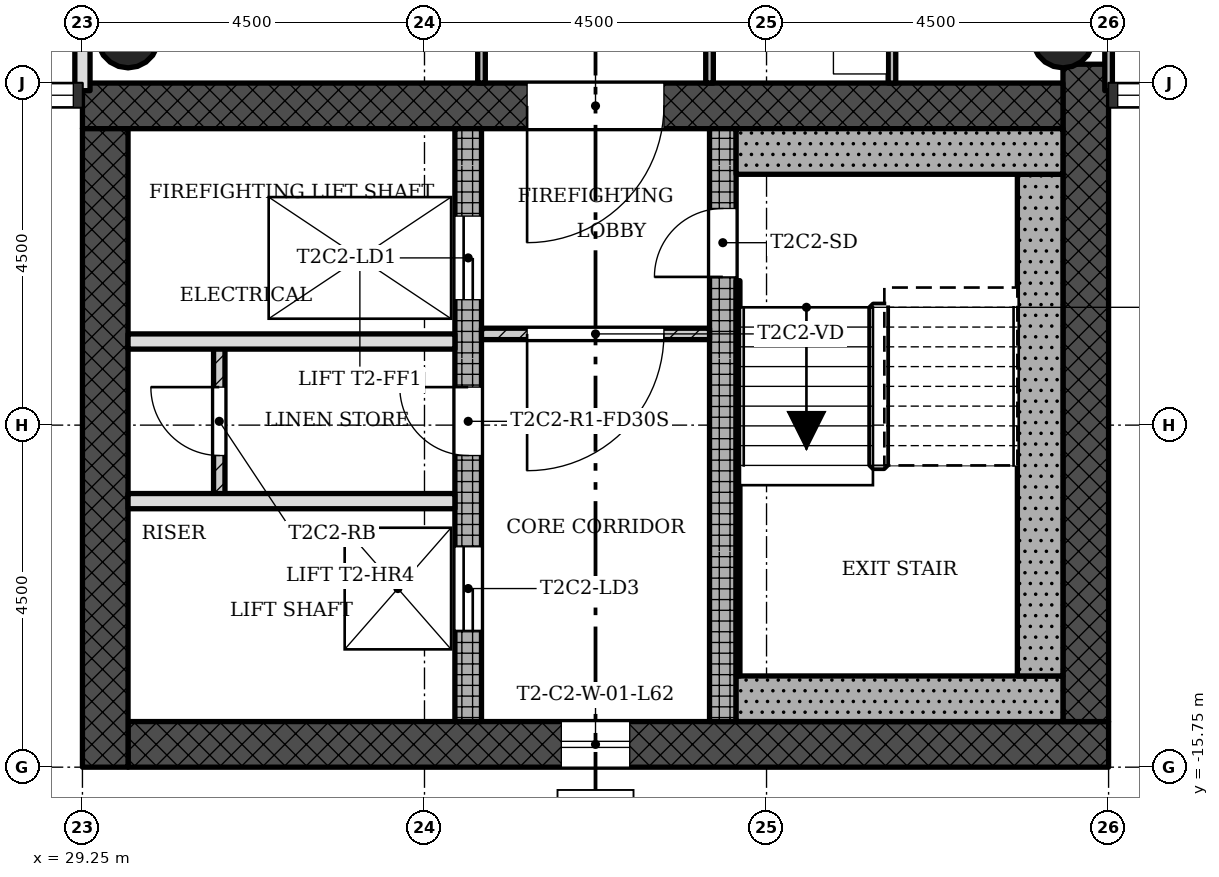
"""IFC4 building model, lengths in metres.
Left out: names, types, materials, properties, quantities, classifications, styles, units other than length and angle.
Written with IfcOpenShell. Run it as: python <this file> out.ifc"""

import sys

from ifc_helpers import new_model, si_unit, direction, frame, frame_2d, origin, origin_2d, place, context, subcontext, project, spatial, rectangle, hollow_circle, extrude, element, fill, save


model = new_model("IFC4")
c1 = context("Model", 3, precision=1e-05, world=origin(), true_north=direction((0.0, 1.0)))
c2 = subcontext(c1, "Body", "Model", "MODEL_VIEW")
j1 = project(units=[si_unit("LENGTHUNIT", "METRE"), si_unit("PLANEANGLEUNIT", "RADIAN")], contexts=[c1])
p1 = place(None, origin())
s1 = spatial("IfcSite", under=j1, at=p1, CompositionType="ELEMENT")
p2 = place(p1, origin())
s2 = spatial("IfcBuilding", under=s1, at=p2, CompositionType="ELEMENT")
p3 = place(p2, frame((0.0, 0.0, 223.2)))
s3 = spatial("IfcBuildingStorey", under=s2, at=p3, CompositionType="ELEMENT", Elevation=223.2)
p4 = place(p3, frame((29.85, -15.45, 0.0), z_axis=(0.0, 0.0, 1.0), x_axis=(1.0, 0.0, 0.0)))
e1 = element("IfcWall", 1, at=p4, inside=s3, PredefinedType="SHEAR", context=c2, shape_type="SweptSolid", body=[
    extrude(rectangle(XDim=12.9, YDim=0.6, at=frame_2d((6.45, 0.0))), origin(), (0.0, 0.0, 1.0), 3.4),
])
p5 = place(p4, frame((5.7, 0.0, 0.45)))
e2 = element("IfcOpeningElement", 2, at=p5, cuts=e1, PredefinedType="OPENING", context=c2, shape_type="SweptSolid", body=[
    extrude(rectangle(XDim=0.9, YDim=2.4, at=frame_2d((0.45, 1.2))), frame((0.0, 0.31, 0.0), z_axis=(0.0, -1.0, 0.0), x_axis=(1.0, 0.0, 0.0)), (0.0, 0.0, 1.0), 0.62),
])
p6 = place(p3, frame((42.45, -15.15, 0.0), z_axis=(0.0, 0.0, 1.0), x_axis=(0.0, 1.0, 0.0)))
e3 = element("IfcWall", 3, at=p6, inside=s3, PredefinedType="SHEAR", context=c2, shape_type="SweptSolid", body=[
    extrude(rectangle(XDim=8.648, YDim=0.6, at=frame_2d((4.324, 0.0))), origin(), (0.0, 0.0, 1.0), 3.4),
])
p7 = place(p3, frame((42.15, -7.05, 0.0), z_axis=(0.0, 0.0, 1.0), x_axis=(-1.0, 0.0, 0.0)))
e4 = element("IfcWall", 4, at=p7, inside=s3, PredefinedType="SHEAR", context=c2, shape_type="SweptSolid", body=[
    extrude(rectangle(XDim=12.9, YDim=0.6, at=frame_2d((6.45, 0.0))), origin(), (0.0, 0.0, 1.0), 3.4),
])
p8 = place(p7, frame((5.25, 0.0, 0.0)))
e5 = element("IfcOpeningElement", 5, at=p8, cuts=e4, PredefinedType="OPENING", context=c2, shape_type="SweptSolid", body=[
    extrude(rectangle(XDim=1.8, YDim=2.1, at=frame_2d((0.9, 1.05))), frame((0.0, 0.31, 0.0), z_axis=(0.0, -1.0, 0.0), x_axis=(1.0, 0.0, 0.0)), (0.0, 0.0, 1.0), 0.62),
])
p9 = place(p3, frame((29.55, -7.35, 0.0), z_axis=(0.0, 0.0, 1.0), x_axis=(0.0, -1.0, 0.0)))
e6 = element("IfcWall", 6, at=p9, inside=s3, PredefinedType="SHEAR", context=c2, shape_type="SweptSolid", body=[
    extrude(rectangle(XDim=8.4, YDim=0.6, at=frame_2d((4.2, 0.0))), origin(), (0.0, 0.0, 1.0), 3.4),
])
p10 = place(p3, frame((34.325, -15.15, 0.0), z_axis=(0.0, 0.0, 1.0), x_axis=(0.0, 1.0, 0.0)))
e7 = element("IfcWall", 7, at=p10, inside=s3, PredefinedType="SHEAR", context=c2, shape_type="SweptSolid", body=[
    extrude(rectangle(XDim=7.8, YDim=0.35, at=frame_2d((3.9, 0.0))), origin(), (0.0, 0.0, 1.0), 3.4),
])
p11 = place(p10, frame((5.55, 0.0, 0.0)))
e8 = element("IfcOpeningElement", 8, at=p11, cuts=e7, PredefinedType="OPENING", context=c2, shape_type="SweptSolid", body=[
    extrude(rectangle(XDim=1.1, YDim=2.1, at=frame_2d((0.55, 1.05))), frame((0.0, 0.185, 0.0), z_axis=(0.0, -1.0, 0.0), x_axis=(1.0, 0.0, 0.0)), (0.0, 0.0, 1.0), 0.37),
])
p12 = place(p10, frame((1.2, 0.0, 0.0)))
e9 = element("IfcOpeningElement", 9, at=p12, cuts=e7, PredefinedType="OPENING", context=c2, shape_type="SweptSolid", body=[
    extrude(rectangle(XDim=1.1, YDim=2.1, at=frame_2d((0.55, 1.05))), frame((0.0, 0.185, 0.0), z_axis=(0.0, -1.0, 0.0), x_axis=(1.0, 0.0, 0.0)), (0.0, 0.0, 1.0), 0.37),
])
p13 = place(p10, frame((3.5, 0.0, 0.0)))
e10 = element("IfcOpeningElement", 10, at=p13, cuts=e7, PredefinedType="OPENING", context=c2, shape_type="SweptSolid", body=[
    extrude(rectangle(XDim=0.9, YDim=2.1, at=frame_2d((0.45, 1.05))), frame((0.0, 0.185, 0.0), z_axis=(0.0, -1.0, 0.0), x_axis=(1.0, 0.0, 0.0)), (0.0, 0.0, 1.0), 0.37),
])
p14 = place(p3, frame((37.675, -15.15, 0.0), z_axis=(0.0, 0.0, 1.0), x_axis=(0.0, 1.0, 0.0)))
e11 = element("IfcWall", 11, at=p14, inside=s3, PredefinedType="SHEAR", context=c2, shape_type="SweptSolid", body=[
    extrude(rectangle(XDim=7.8, YDim=0.35, at=frame_2d((3.9, 0.0))), origin(), (0.0, 0.0, 1.0), 3.4),
])
p15 = place(p14, frame((5.85, 0.0, 0.0)))
e12 = element("IfcOpeningElement", 12, at=p15, cuts=e11, PredefinedType="OPENING", context=c2, shape_type="SweptSolid", body=[
    extrude(rectangle(XDim=0.9, YDim=2.1, at=frame_2d((0.45, 1.05))), frame((0.0, 0.185, 0.0), z_axis=(0.0, -1.0, 0.0), x_axis=(1.0, 0.0, 0.0)), (0.0, 0.0, 1.0), 0.37),
])
for number, where, z_axis, x_axis in (
    (13, (42.15, -6.15, 0.0), (0.0, 0.0, 1.0), (1.0, 0.0, 0.0)),
    (14, (29.85, -6.15, 0.0), (0.0, 0.0, 1.0), (1.0, 0.0, 0.0)),
):
    element("IfcColumn", number, at=place(p3, frame(where, z_axis=z_axis, x_axis=x_axis)), inside=s3, PredefinedType="COLUMN", context=c2, shape_type="SweptSolid", body=[
        extrude(hollow_circle(Radius=0.4, WallThickness=0.028, at=origin_2d()), origin(), (0.0, 0.0, 1.0), 3.4),
    ])
p16 = place(p3, frame((34.5, -10.05, 0.0), z_axis=(0.0, 0.0, 1.0), x_axis=(1.0, 0.0, 0.0)))
e15 = element("IfcWall", 15, at=p16, inside=s3, PredefinedType="PARTITIONING", context=c2, shape_type="SweptSolid", body=[
    extrude(rectangle(XDim=3.0, YDim=0.15, at=frame_2d((1.5, 0.0))), origin(), (0.0, 0.0, 1.0), 3.0),
])
p17 = place(p16, frame((0.6, 0.0, 0.0)))
e16 = element("IfcOpeningElement", 16, at=p17, cuts=e15, PredefinedType="OPENING", context=c2, shape_type="SweptSolid", body=[
    extrude(rectangle(XDim=1.8, YDim=2.1, at=frame_2d((0.9, 1.05))), frame((0.0, 0.085, 0.0), z_axis=(0.0, -1.0, 0.0), x_axis=(1.0, 0.0, 0.0)), (0.0, 0.0, 1.0), 0.17),
])
for number, where, z_axis, x_axis in (
    (17, (29.85, -12.25, 0.0), (0.0, 0.0, 1.0), (1.0, 0.0, 0.0)),
    (18, (29.85, -10.15, 0.0), (0.0, 0.0, 1.0), (1.0, 0.0, 0.0)),
):
    element("IfcWall", number, at=place(p3, frame(where, z_axis=z_axis, x_axis=x_axis)), inside=s3, PredefinedType="SOLIDWALL", context=c2, shape_type="SweptSolid", body=[
        extrude(rectangle(XDim=4.3, YDim=0.2, at=frame_2d((2.15, 0.0))), origin(), (0.0, 0.0, 1.0), 3.0),
    ])
p18 = place(p3, frame((31.05, -10.15, 0.0), z_axis=(0.0, 0.0, 1.0), x_axis=(0.0, -1.0, 0.0)))
e19 = element("IfcWall", 19, at=p18, inside=s3, PredefinedType="PARTITIONING", context=c2, shape_type="SweptSolid", body=[
    extrude(rectangle(XDim=2.1, YDim=0.15, at=frame_2d((1.05, 0.0))), origin(), (0.0, 0.0, 1.0), 3.0),
])
p19 = place(p18, frame((0.6, 0.0, 0.0)))
e20 = element("IfcOpeningElement", 20, at=p19, cuts=e19, PredefinedType="OPENING", context=c2, shape_type="SweptSolid", body=[
    extrude(rectangle(XDim=0.9, YDim=2.1, at=frame_2d((0.45, 1.05))), frame((0.0, 0.085, 0.0), z_axis=(0.0, -1.0, 0.0), x_axis=(1.0, 0.0, 0.0)), (0.0, 0.0, 1.0), 0.17),
])
p20 = place(p3, frame((42.75, -6.85, 0.0), z_axis=(0.0, 0.0, 1.0), x_axis=(0.0, 1.0, 0.0)))
e21 = element("IfcWall", 21, at=p20, inside=s3, PredefinedType="PARTITIONING", context=c2, shape_type="SweptSolid", body=[
    extrude(rectangle(XDim=5.95, YDim=0.1, at=frame_2d((2.975, 0.0))), origin(), (0.0, 0.0, 1.0), 3.0),
])
p21 = place(p3, frame((39.9, -6.75, 0.0), z_axis=(0.0, 0.0, 1.0), x_axis=(0.0, 1.0, 0.0)))
e22 = element("IfcWall", 22, at=p21, inside=s3, PredefinedType="PARTITIONING", context=c2, shape_type="SweptSolid", body=[
    extrude(rectangle(XDim=2.25, YDim=0.1, at=frame_2d((1.125, 0.0))), origin(), (0.0, 0.0, 1.0), 3.0),
])
p22 = place(p3, frame((37.5, -6.75, 0.0), z_axis=(0.0, 0.0, 1.0), x_axis=(0.0, 1.0, 0.0)))
e23 = element("IfcWall", 23, at=p22, inside=s3, PredefinedType="PARTITIONING", context=c2, shape_type="SweptSolid", body=[
    extrude(rectangle(XDim=2.25, YDim=0.1, at=frame_2d((1.125, 0.0))), origin(), (0.0, 0.0, 1.0), 3.0),
])
p23 = place(p22, frame((0.675, 0.0, 0.0)))
e24 = element("IfcOpeningElement", 24, at=p23, cuts=e23, PredefinedType="OPENING", context=c2, shape_type="SweptSolid", body=[
    extrude(rectangle(XDim=0.9, YDim=2.1, at=frame_2d((0.45, 1.05))), frame((0.0, 0.06, 0.0), z_axis=(0.0, -1.0, 0.0), x_axis=(1.0, 0.0, 0.0)), (0.0, 0.0, 1.0), 0.12),
])
p24 = place(p3, frame((34.5, -6.75, 0.0), z_axis=(0.0, 0.0, 1.0), x_axis=(0.0, 1.0, 0.0)))
e25 = element("IfcWall", 25, at=p24, inside=s3, PredefinedType="PARTITIONING", context=c2, shape_type="SweptSolid", body=[
    extrude(rectangle(XDim=2.25, YDim=0.1, at=frame_2d((1.125, 0.0))), origin(), (0.0, 0.0, 1.0), 3.0),
])
p25 = place(p3, frame((29.25, -6.85, 0.0), z_axis=(0.0, 0.0, 1.0), x_axis=(0.0, 1.0, 0.0)))
e26 = element("IfcWall", 26, at=p25, inside=s3, PredefinedType="SOLIDWALL", context=c2, shape_type="SweptSolid", body=[
    extrude(rectangle(XDim=13.7, YDim=0.2, at=frame_2d((6.85, 0.0))), origin(), (0.0, 0.0, 1.0), 3.0),
])
p26 = place(p25, frame((6.4, 0.0, 0.0)))
e27 = element("IfcOpeningElement", 27, at=p26, cuts=e26, PredefinedType="OPENING", context=c2, shape_type="SweptSolid", body=[
    extrude(rectangle(XDim=0.9, YDim=2.1, at=frame_2d((0.45, 1.05))), frame((0.0, 0.11, 0.0), z_axis=(0.0, -1.0, 0.0), x_axis=(1.0, 0.0, 0.0)), (0.0, 0.0, 1.0), 0.22),
])
p27 = place(p3, frame((37.85, -14.85, 0.0), z_axis=(0.0, 0.0, 1.0), x_axis=(1.0, 0.0, 0.0)))
e28 = element("IfcWall", 28, at=p27, inside=s3, PredefinedType="SHEAR", context=c2, shape_type="SweptSolid", body=[
    extrude(rectangle(XDim=4.3, YDim=0.6, at=frame_2d((2.15, 0.0))), origin(), (0.0, 0.0, 1.0), 3.4),
])
p28 = place(p3, frame((41.85, -7.95, 0.0), z_axis=(0.0, 0.0, 1.0), x_axis=(0.0, -1.0, 0.0)))
e29 = element("IfcWall", 29, at=p28, inside=s3, PredefinedType="SHEAR", context=c2, shape_type="SweptSolid", body=[
    extrude(rectangle(XDim=6.6, YDim=0.6, at=frame_2d((3.3, 0.0))), origin(), (0.0, 0.0, 1.0), 3.4),
])
p29 = place(p3, frame((37.85, -7.65, 0.0), z_axis=(0.0, 0.0, 1.0), x_axis=(1.0, 0.0, 0.0)))
e30 = element("IfcWall", 30, at=p29, inside=s3, PredefinedType="SHEAR", context=c2, shape_type="SweptSolid", body=[
    extrude(rectangle(XDim=4.3, YDim=0.6, at=frame_2d((2.15, 0.0))), origin(), (0.0, 0.0, 1.0), 3.4),
])
p30 = place(p3, frame((37.875, -9.35, 0.0), z_axis=(0.0, 0.0, 1.0), x_axis=(0.0, -1.0, 0.0)))
e31 = element("IfcWall", 31, at=p30, inside=s3, PredefinedType="SHEAR", context=c2, shape_type="SweptSolid", body=[
    extrude(rectangle(XDim=5.2, YDim=0.05, at=frame_2d((2.6, 0.0))), origin(), (0.0, 0.0, 1.0), 3.4),
])
p31 = place(p5, origin())
e32 = element("IfcWindow", 32, at=p31, inside=s3, PartitioningType="SINGLE_PANEL", PredefinedType="WINDOW", context=c2, shape_type="SweptSolid", body=[
    extrude(rectangle(XDim=0.9, YDim=2.4, at=frame_2d((0.45, 1.2))), frame((0.0, 0.03, 0.0), z_axis=(0.0, -1.0, 0.0), x_axis=(1.0, 0.0, 0.0)), (0.0, 0.0, 1.0), 0.06),
])
fill(e2, e32)
p32 = place(p17, origin())
e33 = element("IfcDoor", 33, at=p32, inside=s3, OperationType="SINGLE_SWING_LEFT", PredefinedType="DOOR", context=c2, shape_type="SweptSolid", body=[
    extrude(rectangle(XDim=1.8, YDim=2.1, at=frame_2d((0.9, 1.05))), frame((0.0, 0.025, 0.0), z_axis=(0.0, -1.0, 0.0), x_axis=(1.0, 0.0, 0.0)), (0.0, 0.0, 1.0), 0.05),
])
fill(e16, e33)
p33 = place(p19, origin())
e34 = element("IfcDoor", 34, at=p33, inside=s3, OperationType="SINGLE_SWING_LEFT", PredefinedType="DOOR", context=c2, shape_type="SweptSolid", body=[
    extrude(rectangle(XDim=0.9, YDim=2.1, at=frame_2d((0.45, 1.05))), frame((0.0, 0.025, 0.0), z_axis=(0.0, -1.0, 0.0), x_axis=(1.0, 0.0, 0.0)), (0.0, 0.0, 1.0), 0.05),
])
fill(e20, e34)
p34 = place(p15, origin())
e35 = element("IfcDoor", 35, at=p34, inside=s3, OperationType="SINGLE_SWING_RIGHT", PredefinedType="DOOR", context=c2, shape_type="SweptSolid", body=[
    extrude(rectangle(XDim=0.9, YDim=2.1, at=frame_2d((0.45, 1.05))), frame((0.0, 0.025, 0.0), z_axis=(0.0, -1.0, 0.0), x_axis=(1.0, 0.0, 0.0)), (0.0, 0.0, 1.0), 0.05),
])
fill(e12, e35)
p35 = place(p11, origin())
e36 = element("IfcDoor", 36, at=p35, inside=s3, OperationType="SLIDING_TO_LEFT", PredefinedType="DOOR", context=c2, shape_type="SweptSolid", body=[
    extrude(rectangle(XDim=1.1, YDim=2.1, at=frame_2d((0.55, 1.05))), frame((0.0, 0.025, 0.0), z_axis=(0.0, -1.0, 0.0), x_axis=(1.0, 0.0, 0.0)), (0.0, 0.0, 1.0), 0.05),
])
fill(e8, e36)
p36 = place(p12, origin())
e37 = element("IfcDoor", 37, at=p36, inside=s3, OperationType="SLIDING_TO_LEFT", PredefinedType="DOOR", context=c2, shape_type="SweptSolid", body=[
    extrude(rectangle(XDim=1.1, YDim=2.1, at=frame_2d((0.55, 1.05))), frame((0.0, 0.025, 0.0), z_axis=(0.0, -1.0, 0.0), x_axis=(1.0, 0.0, 0.0)), (0.0, 0.0, 1.0), 0.05),
])
fill(e9, e37)
p37 = place(p13, origin())
e38 = element("IfcDoor", 38, at=p37, inside=s3, OperationType="SINGLE_SWING_LEFT", PredefinedType="DOOR", context=c2, shape_type="SweptSolid", body=[
    extrude(rectangle(XDim=0.9, YDim=2.1, at=frame_2d((0.45, 1.05))), frame((0.0, 0.025, 0.0), z_axis=(0.0, -1.0, 0.0), x_axis=(1.0, 0.0, 0.0)), (0.0, 0.0, 1.0), 0.05),
])
fill(e10, e38)
p38 = place(p8, origin())
e39 = element("IfcDoor", 39, at=p38, inside=s3, OperationType="SINGLE_SWING_LEFT", PredefinedType="DOOR", context=c2, shape_type="SweptSolid", body=[
    extrude(rectangle(XDim=1.8, YDim=2.1, at=frame_2d((0.9, 1.05))), frame((0.0, 0.025, 0.0), z_axis=(0.0, -1.0, 0.0), x_axis=(1.0, 0.0, 0.0)), (0.0, 0.0, 1.0), 0.05),
])
fill(e5, e39)
save(model, sys.argv[1])
